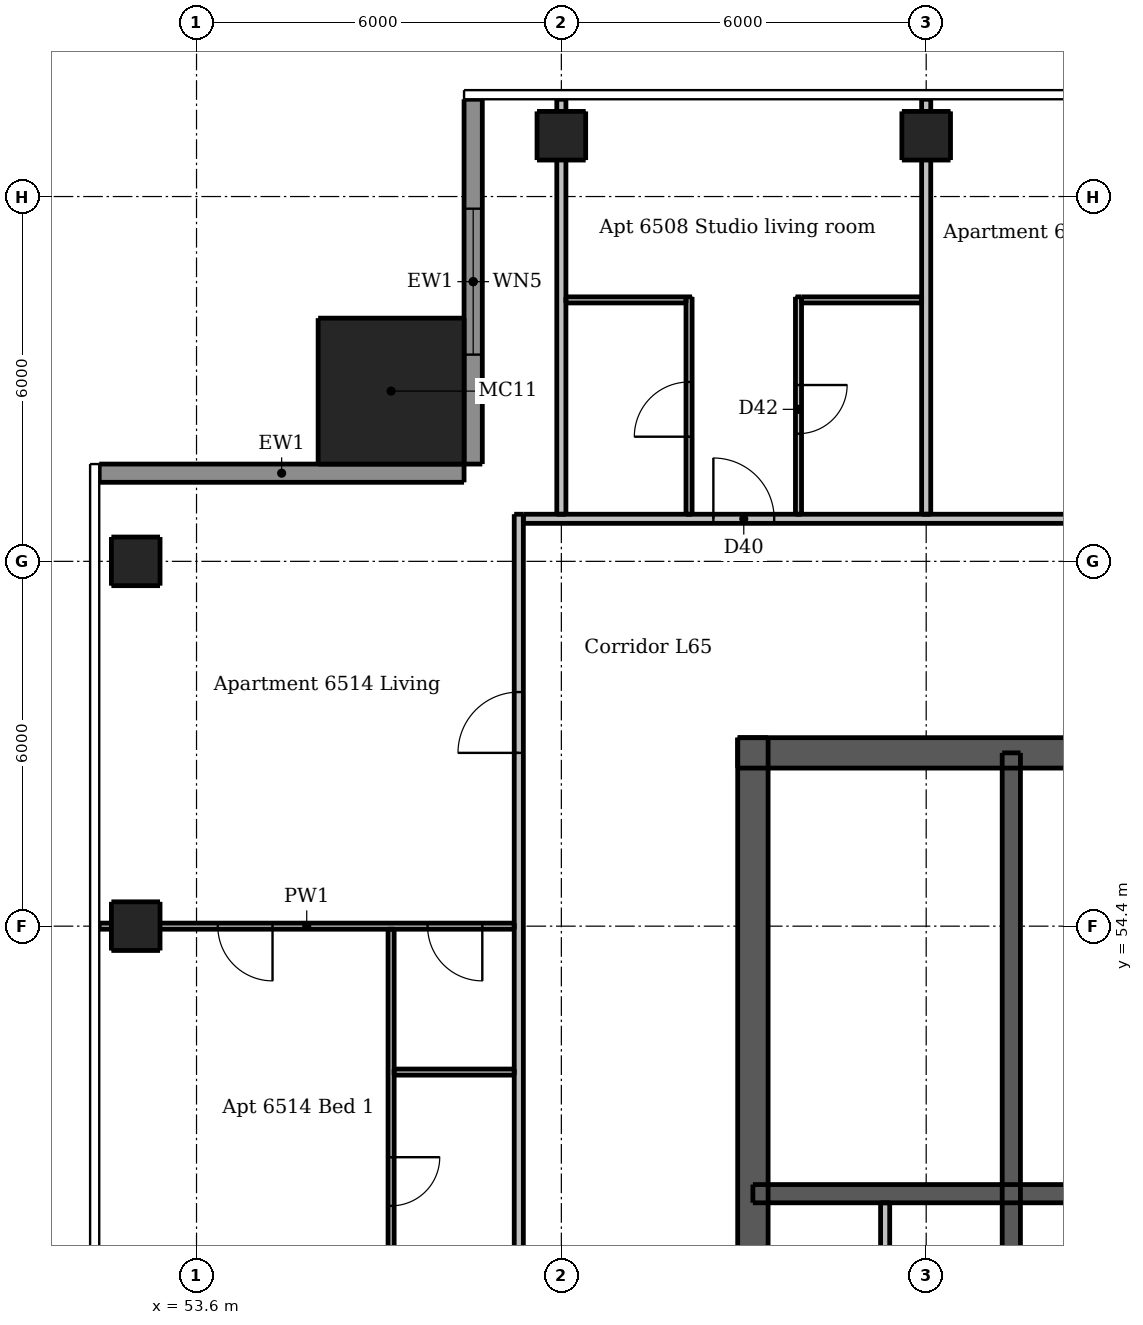
"""IFC4 building model, lengths in metres.
Left out: names, types, materials, properties, quantities, classifications, styles, units other than length and angle.
Written with IfcOpenShell. Run it as: python <this file> out.ifc"""

import sys

from ifc_helpers import new_model, si_unit, direction, frame, frame_2d, origin, origin_2d, place, context, subcontext, project, spatial, rectangle, extrude, element, fill, save


model = new_model("IFC4")
c1 = context("Model", 3, precision=1e-05, world=origin(), true_north=direction((0.0, 1.0)))
c2 = subcontext(c1, "Body", "Model", "MODEL_VIEW")
j1 = project(units=[si_unit("LENGTHUNIT", "METRE"), si_unit("PLANEANGLEUNIT", "RADIAN")], contexts=[c1])
p1 = place(None, origin())
s1 = spatial("IfcSite", under=j1, at=p1, CompositionType="ELEMENT")
p2 = place(p1, origin())
s2 = spatial("IfcBuilding", under=s1, at=p2, CompositionType="ELEMENT")
p3 = place(p2, frame((0.0, 0.0, 245.5)))
s3 = spatial("IfcBuildingStorey", under=s2, at=p3, CompositionType="ELEMENT", Elevation=245.5)
p4 = place(p3, frame((62.5, 57.25, 0.0), z_axis=(0.0, 0.0, 1.0), x_axis=(1.0, 0.0, 0.0)))
e1 = element("IfcWall", 1, at=p4, inside=s3, PredefinedType="SHEAR", context=c2, shape_type="SweptSolid", body=[
    extrude(rectangle(XDim=24.0, YDim=0.5, at=frame_2d((12.0, 0.0))), origin(), (0.0, 0.0, 1.0), 3.05),
])
p5 = place(p4, frame((21.025, 0.0, 0.0)))
e2 = element("IfcOpeningElement", 2, at=p5, cuts=e1, PredefinedType="OPENING", context=c2, shape_type="SweptSolid", body=[
    extrude(rectangle(XDim=1.1, YDim=2.1, at=frame_2d((0.55, 1.05))), frame((0.0, 0.26, 0.0), z_axis=(0.0, -1.0, 0.0), x_axis=(1.0, 0.0, 0.0)), (0.0, 0.0, 1.0), 0.52),
])
p6 = place(p4, frame((1.875, 0.0, 0.0)))
e3 = element("IfcOpeningElement", 3, at=p6, cuts=e1, PredefinedType="OPENING", context=c2, shape_type="SweptSolid", body=[
    extrude(rectangle(XDim=1.1, YDim=2.1, at=frame_2d((0.55, 1.05))), frame((0.0, 0.26, 0.0), z_axis=(0.0, -1.0, 0.0), x_axis=(1.0, 0.0, 0.0)), (0.0, 0.0, 1.0), 0.52),
])
p7 = place(p4, frame((7.875, 0.0, 0.0)))
e4 = element("IfcOpeningElement", 4, at=p7, cuts=e1, PredefinedType="OPENING", context=c2, shape_type="SweptSolid", body=[
    extrude(rectangle(XDim=0.9, YDim=2.1, at=frame_2d((0.45, 1.05))), frame((0.0, 0.26, 0.0), z_axis=(0.0, -1.0, 0.0), x_axis=(1.0, 0.0, 0.0)), (0.0, 0.0, 1.0), 0.52),
])
p8 = place(p4, frame((15.225, 0.0, 0.0)))
e5 = element("IfcOpeningElement", 5, at=p8, cuts=e1, PredefinedType="OPENING", context=c2, shape_type="SweptSolid", body=[
    extrude(rectangle(XDim=0.9, YDim=2.1, at=frame_2d((0.45, 1.05))), frame((0.0, 0.26, 0.0), z_axis=(0.0, -1.0, 0.0), x_axis=(1.0, 0.0, 0.0)), (0.0, 0.0, 1.0), 0.52),
])
p9 = place(p3, frame((62.75, 33.5, 0.0), z_axis=(0.0, 0.0, 1.0), x_axis=(0.0, 1.0, 0.0)))
e6 = element("IfcWall", 6, at=p9, inside=s3, PredefinedType="SHEAR", context=c2, shape_type="SweptSolid", body=[
    extrude(rectangle(XDim=24.0, YDim=0.5, at=frame_2d((12.0, 0.0))), origin(), (0.0, 0.0, 1.0), 3.05),
])
p10 = place(p9, frame((11.2, 0.0, 0.0)))
e7 = element("IfcOpeningElement", 7, at=p10, cuts=e6, PredefinedType="OPENING", context=c2, shape_type="SweptSolid", body=[
    extrude(rectangle(XDim=1.6, YDim=2.1, at=frame_2d((0.8, 1.05))), frame((0.0, 0.26, 0.0), z_axis=(0.0, -1.0, 0.0), x_axis=(1.0, 0.0, 0.0)), (0.0, 0.0, 1.0), 0.52),
])
p11 = place(p3, frame((62.75, 50.0, 0.0), z_axis=(0.0, 0.0, 1.0), x_axis=(1.0, 0.0, 0.0)))
e8 = element("IfcWall", 8, at=p11, inside=s3, PredefinedType="SHEAR", context=c2, shape_type="SweptSolid", body=[
    extrude(rectangle(XDim=23.5, YDim=0.3, at=frame_2d((11.75, 0.0))), origin(), (0.0, 0.0, 1.0), 3.05),
])
p12 = place(p3, frame((67.0, 47.1, 0.0), z_axis=(0.0, 0.0, 1.0), x_axis=(0.0, 1.0, 0.0)))
e9 = element("IfcWall", 9, at=p12, inside=s3, PredefinedType="SHEAR", context=c2, shape_type="SweptSolid", body=[
    extrude(rectangle(XDim=10.15, YDim=0.3, at=frame_2d((5.075, 0.0))), origin(), (0.0, 0.0, 1.0), 3.05),
])
for number, where, z_axis, x_axis in (
    (10, (59.6, 67.4, 0.0), (0.0, 0.0, 1.0), (1.0, 0.0, 0.0)),
    (11, (65.6, 67.4, 0.0), (0.0, 0.0, 1.0), (1.0, 0.0, 0.0)),
    (12, (52.6, 54.4, 0.0), (0.0, 0.0, 1.0), (1.0, 0.0, 0.0)),
    (13, (52.6, 60.4, 0.0), (0.0, 0.0, 1.0), (1.0, 0.0, 0.0)),
):
    element("IfcColumn", number, at=place(p3, frame(where, z_axis=z_axis, x_axis=x_axis)), inside=s3, PredefinedType="COLUMN", context=c2, shape_type="SweptSolid", body=[
        extrude(rectangle(XDim=0.8, YDim=0.8, at=origin_2d()), origin(), (0.0, 0.0, 1.0), 3.05),
    ])
p13 = place(p3, frame((56.8, 63.2, 0.0), z_axis=(0.0, 0.0, 1.0), x_axis=(1.0, 0.0, 0.0)))
e14 = element("IfcColumn", 14, at=p13, inside=s3, PredefinedType="COLUMN", context=c2, shape_type="SweptSolid", body=[
    extrude(rectangle(XDim=2.4, YDim=2.4, at=origin_2d()), origin(), (0.0, 0.0, 1.0), 3.3),
])
p14 = place(p3, frame((58.15, 68.0, 0.0), z_axis=(0.0, 0.0, 1.0), x_axis=(0.0, -1.0, 0.0)))
e15 = element("IfcWall", 15, at=p14, inside=s3, PredefinedType="SOLIDWALL", context=c2, shape_type="SweptSolid", body=[
    extrude(rectangle(XDim=6.0, YDim=0.3, at=frame_2d((3.0, 0.0))), origin(), (0.0, 0.0, 1.0), 3.05),
])
p15 = place(p14, frame((1.8, 0.0, 0.15)))
e16 = element("IfcOpeningElement", 16, at=p15, cuts=e15, PredefinedType="OPENING", context=c2, shape_type="SweptSolid", body=[
    extrude(rectangle(XDim=2.4, YDim=2.1, at=frame_2d((1.2, 1.05))), frame((0.0, 0.16, 0.0), z_axis=(0.0, -1.0, 0.0), x_axis=(1.0, 0.0, 0.0)), (0.0, 0.0, 1.0), 0.32),
])
p16 = place(p3, frame((58.0, 61.85, 0.0), z_axis=(0.0, 0.0, 1.0), x_axis=(-1.0, 0.0, 0.0)))
e17 = element("IfcWall", 17, at=p16, inside=s3, PredefinedType="SOLIDWALL", context=c2, shape_type="SweptSolid", body=[
    extrude(rectangle(XDim=6.0, YDim=0.3, at=frame_2d((3.0, 0.0))), origin(), (0.0, 0.0, 1.0), 3.05),
])
p17 = place(p3, frame((64.925, 47.25, 0.0), z_axis=(0.0, 0.0, 1.0), x_axis=(0.0, 1.0, 0.0)))
e18 = element("IfcWall", 18, at=p17, inside=s3, PredefinedType="PLUMBINGWALL", context=c2, shape_type="SweptSolid", body=[
    extrude(rectangle(XDim=2.6, YDim=0.15, at=frame_2d((1.3, 0.0))), origin(), (0.0, 0.0, 1.0), 3.05),
])
p18 = place(p3, frame((56.8, 54.35, 0.0), z_axis=(0.0, 0.0, 1.0), x_axis=(0.0, -1.0, 0.0)))
e19 = element("IfcWall", 19, at=p18, inside=s3, PredefinedType="PARTITIONING", context=c2, shape_type="SweptSolid", body=[
    extrude(rectangle(XDim=5.875, YDim=0.1, at=frame_2d((2.938, 0.0))), origin(), (0.0, 0.0, 1.0), 3.05),
])
p19 = place(p18, frame((3.75, 0.0, 0.0)))
e20 = element("IfcOpeningElement", 20, at=p19, cuts=e19, PredefinedType="OPENING", context=c2, shape_type="SweptSolid", body=[
    extrude(rectangle(XDim=0.8, YDim=2.1, at=frame_2d((0.4, 1.05))), frame((0.0, 0.06, 0.0), z_axis=(0.0, -1.0, 0.0), x_axis=(1.0, 0.0, 0.0)), (0.0, 0.0, 1.0), 0.12),
])
p20 = place(p3, frame((61.7, 61.175, 0.0), z_axis=(0.0, 0.0, 1.0), x_axis=(0.0, 1.0, 0.0)))
e21 = element("IfcWall", 21, at=p20, inside=s3, PredefinedType="PARTITIONING", context=c2, shape_type="SweptSolid", body=[
    extrude(rectangle(XDim=3.575, YDim=0.1, at=frame_2d((1.788, 0.0))), origin(), (0.0, 0.0, 1.0), 3.05),
])
p21 = place(p20, frame((1.275, 0.0, 0.0)))
e22 = element("IfcOpeningElement", 22, at=p21, cuts=e21, PredefinedType="OPENING", context=c2, shape_type="SweptSolid", body=[
    extrude(rectangle(XDim=0.9, YDim=2.1, at=frame_2d((0.45, 1.05))), frame((0.0, 0.06, 0.0), z_axis=(0.0, -1.0, 0.0), x_axis=(1.0, 0.0, 0.0)), (0.0, 0.0, 1.0), 0.12),
])
p22 = place(p3, frame((63.5, 64.75, 0.0), z_axis=(0.0, 0.0, 1.0), x_axis=(0.0, -1.0, 0.0)))
e23 = element("IfcWall", 23, at=p22, inside=s3, PredefinedType="PARTITIONING", context=c2, shape_type="SweptSolid", body=[
    extrude(rectangle(XDim=3.575, YDim=0.1, at=frame_2d((1.788, 0.0))), origin(), (0.0, 0.0, 1.0), 3.05),
])
p23 = place(p22, frame((1.45, 0.0, 0.0)))
e24 = element("IfcOpeningElement", 24, at=p23, cuts=e23, PredefinedType="OPENING", context=c2, shape_type="SweptSolid", body=[
    extrude(rectangle(XDim=0.8, YDim=2.1, at=frame_2d((0.4, 1.05))), frame((0.0, 0.06, 0.0), z_axis=(0.0, -1.0, 0.0), x_axis=(1.0, 0.0, 0.0)), (0.0, 0.0, 1.0), 0.12),
])
for number, where, z_axis, x_axis in (
    (25, (59.675, 64.7, 0.0), (0.0, 0.0, 1.0), (1.0, 0.0, 0.0)),
    (26, (63.55, 64.7, 0.0), (0.0, 0.0, 1.0), (1.0, 0.0, 0.0)),
):
    element("IfcWall", number, at=place(p3, frame(where, z_axis=z_axis, x_axis=x_axis)), inside=s3, PredefinedType="PARTITIONING", context=c2, shape_type="SweptSolid", body=[
        extrude(rectangle(XDim=1.975, YDim=0.1, at=frame_2d((0.987, 0.0))), origin(), (0.0, 0.0, 1.0), 3.05),
    ])
p24 = place(p3, frame((58.825, 54.4, 0.0), z_axis=(0.0, 0.0, 1.0), x_axis=(-1.0, 0.0, 0.0)))
e27 = element("IfcWall", 27, at=p24, inside=s3, PredefinedType="PARTITIONING", context=c2, shape_type="SweptSolid", body=[
    extrude(rectangle(XDim=6.825, YDim=0.1, at=frame_2d((3.413, 0.0))), origin(), (0.0, 0.0, 1.0), 2.516),
])
p25 = place(p24, frame((0.525, 0.0, 0.0)))
e28 = element("IfcOpeningElement", 28, at=p25, cuts=e27, PredefinedType="OPENING", context=c2, shape_type="SweptSolid", body=[
    extrude(rectangle(XDim=0.9, YDim=2.1, at=frame_2d((0.45, 1.05))), frame((0.0, 0.06, 0.0), z_axis=(0.0, -1.0, 0.0), x_axis=(1.0, 0.0, 0.0)), (0.0, 0.0, 1.0), 0.12),
])
p26 = place(p24, frame((3.975, 0.0, 0.0)))
e29 = element("IfcOpeningElement", 29, at=p26, cuts=e27, PredefinedType="OPENING", context=c2, shape_type="SweptSolid", body=[
    extrude(rectangle(XDim=0.9, YDim=2.1, at=frame_2d((0.45, 1.05))), frame((0.0, 0.06, 0.0), z_axis=(0.0, -1.0, 0.0), x_axis=(1.0, 0.0, 0.0)), (0.0, 0.0, 1.0), 0.12),
])
p27 = place(p3, frame((56.85, 52.0, 0.0), z_axis=(0.0, 0.0, 1.0), x_axis=(1.0, 0.0, 0.0)))
e30 = element("IfcWall", 30, at=p27, inside=s3, PredefinedType="PARTITIONING", context=c2, shape_type="SweptSolid", body=[
    extrude(rectangle(XDim=1.975, YDim=0.1, at=frame_2d((0.987, 0.0))), origin(), (0.0, 0.0, 1.0), 3.05),
])
p28 = place(p3, frame((58.9, 30.325, 0.0), z_axis=(0.0, 0.0, 1.0), x_axis=(0.0, 1.0, 0.0)))
e31 = element("IfcWall", 31, at=p28, inside=s3, PredefinedType="PARTITIONING", context=c2, shape_type="SweptSolid", body=[
    extrude(rectangle(XDim=30.85, YDim=0.15, at=frame_2d((15.425, 0.0))), origin(), (0.0, 0.0, 1.0), 3.05),
])
p29 = place(p28, frame((2.575, 0.0, 0.0)))
e32 = element("IfcOpeningElement", 32, at=p29, cuts=e31, PredefinedType="OPENING", context=c2, shape_type="SweptSolid", body=[
    extrude(rectangle(XDim=1.0, YDim=2.1, at=frame_2d((0.5, 1.05))), frame((0.0, 0.085, 0.0), z_axis=(0.0, -1.0, 0.0), x_axis=(1.0, 0.0, 0.0)), (0.0, 0.0, 1.0), 0.17),
])
p30 = place(p28, frame((8.575, 0.0, 0.0)))
e33 = element("IfcOpeningElement", 33, at=p30, cuts=e31, PredefinedType="OPENING", context=c2, shape_type="SweptSolid", body=[
    extrude(rectangle(XDim=1.0, YDim=2.1, at=frame_2d((0.5, 1.05))), frame((0.0, 0.085, 0.0), z_axis=(0.0, -1.0, 0.0), x_axis=(1.0, 0.0, 0.0)), (0.0, 0.0, 1.0), 0.17),
])
p31 = place(p28, frame((14.575, 0.0, 0.0)))
e34 = element("IfcOpeningElement", 34, at=p31, cuts=e31, PredefinedType="OPENING", context=c2, shape_type="SweptSolid", body=[
    extrude(rectangle(XDim=1.0, YDim=2.1, at=frame_2d((0.5, 1.05))), frame((0.0, 0.085, 0.0), z_axis=(0.0, -1.0, 0.0), x_axis=(1.0, 0.0, 0.0)), (0.0, 0.0, 1.0), 0.17),
])
p32 = place(p28, frame((26.925, 0.0, 0.0)))
e35 = element("IfcOpeningElement", 35, at=p32, cuts=e31, PredefinedType="OPENING", context=c2, shape_type="SweptSolid", body=[
    extrude(rectangle(XDim=1.0, YDim=2.1, at=frame_2d((0.5, 1.05))), frame((0.0, 0.085, 0.0), z_axis=(0.0, -1.0, 0.0), x_axis=(1.0, 0.0, 0.0)), (0.0, 0.0, 1.0), 0.17),
])
p33 = place(p3, frame((59.6, 61.175, 0.0), z_axis=(0.0, 0.0, 1.0), x_axis=(0.0, 1.0, 0.0)))
e36 = element("IfcWall", 36, at=p33, inside=s3, PredefinedType="PARTITIONING", context=c2, shape_type="SweptSolid", body=[
    extrude(rectangle(XDim=6.825, YDim=0.15, at=frame_2d((3.413, 0.0))), origin(), (0.0, 0.0, 1.0), 2.51),
])
p34 = place(p3, frame((65.6, 61.175, 0.0), z_axis=(0.0, 0.0, 1.0), x_axis=(0.0, 1.0, 0.0)))
e37 = element("IfcWall", 37, at=p34, inside=s3, PredefinedType="PARTITIONING", context=c2, shape_type="SweptSolid", body=[
    extrude(rectangle(XDim=6.825, YDim=0.15, at=frame_2d((3.413, 0.0))), origin(), (0.0, 0.0, 1.0), 2.516),
])
p35 = place(p3, frame((58.975, 61.1, 0.0), z_axis=(0.0, 0.0, 1.0), x_axis=(1.0, 0.0, 0.0)))
e38 = element("IfcWall", 38, at=p35, inside=s3, PredefinedType="PARTITIONING", context=c2, shape_type="SweptSolid", body=[
    extrude(rectangle(XDim=29.25, YDim=0.15, at=frame_2d((14.625, 0.0))), origin(), (0.0, 0.0, 1.0), 3.05),
])
p36 = place(p35, frame((3.125, 0.0, 0.0)))
e39 = element("IfcOpeningElement", 39, at=p36, cuts=e38, PredefinedType="OPENING", context=c2, shape_type="SweptSolid", body=[
    extrude(rectangle(XDim=1.0, YDim=2.1, at=frame_2d((0.5, 1.05))), frame((0.0, 0.085, 0.0), z_axis=(0.0, -1.0, 0.0), x_axis=(1.0, 0.0, 0.0)), (0.0, 0.0, 1.0), 0.17),
])
p37 = place(p35, frame((13.925, 0.0, 0.0)))
e40 = element("IfcOpeningElement", 40, at=p37, cuts=e38, PredefinedType="OPENING", context=c2, shape_type="SweptSolid", body=[
    extrude(rectangle(XDim=1.0, YDim=2.1, at=frame_2d((0.5, 1.05))), frame((0.0, 0.085, 0.0), z_axis=(0.0, -1.0, 0.0), x_axis=(1.0, 0.0, 0.0)), (0.0, 0.0, 1.0), 0.17),
])
p38 = place(p35, frame((26.475, 0.0, 0.0)))
e41 = element("IfcOpeningElement", 41, at=p38, cuts=e38, PredefinedType="OPENING", context=c2, shape_type="SweptSolid", body=[
    extrude(rectangle(XDim=1.0, YDim=2.1, at=frame_2d((0.5, 1.05))), frame((0.0, 0.085, 0.0), z_axis=(0.0, -1.0, 0.0), x_axis=(1.0, 0.0, 0.0)), (0.0, 0.0, 1.0), 0.17),
])
p39 = place(p15, origin())
e42 = element("IfcWindow", 42, at=p39, inside=s3, PartitioningType="DOUBLE_PANEL_VERTICAL", PredefinedType="WINDOW", context=c2, shape_type="SweptSolid", body=[
    extrude(rectangle(XDim=2.4, YDim=2.1, at=frame_2d((1.2, 1.05))), frame((0.0, 0.03, 0.0), z_axis=(0.0, -1.0, 0.0), x_axis=(1.0, 0.0, 0.0)), (0.0, 0.0, 1.0), 0.06),
])
fill(e16, e42)
p40 = place(p6, origin())
e43 = element("IfcDoor", 43, at=p40, inside=s3, OperationType="SINGLE_SWING_LEFT", PredefinedType="DOOR", context=c2, shape_type="SweptSolid", body=[
    extrude(rectangle(XDim=1.1, YDim=2.1, at=frame_2d((0.55, 1.05))), frame((0.0, -0.188, 0.0), z_axis=(0.0, -1.0, 0.0), x_axis=(1.0, 0.0, 0.0)), (0.0, 0.0, 1.0), 0.05),
])
fill(e3, e43)
p41 = place(p36, origin())
e44 = element("IfcDoor", 44, at=p41, inside=s3, OperationType="SINGLE_SWING_LEFT", PredefinedType="DOOR", context=c2, shape_type="SweptSolid", body=[
    extrude(rectangle(XDim=1.0, YDim=2.1, at=frame_2d((0.5, 1.05))), frame((0.0, 0.025, 0.0), z_axis=(0.0, -1.0, 0.0), x_axis=(1.0, 0.0, 0.0)), (0.0, 0.0, 1.0), 0.05),
])
fill(e39, e44)
p42 = place(p21, origin())
e45 = element("IfcDoor", 45, at=p42, inside=s3, OperationType="SINGLE_SWING_LEFT", PredefinedType="DOOR", context=c2, shape_type="SweptSolid", body=[
    extrude(rectangle(XDim=0.9, YDim=2.1, at=frame_2d((0.45, 1.05))), frame((0.0, 0.025, 0.0), z_axis=(0.0, -1.0, 0.0), x_axis=(1.0, 0.0, 0.0)), (0.0, 0.0, 1.0), 0.05),
])
fill(e22, e45)
p43 = place(p23, origin())
e46 = element("IfcDoor", 46, at=p43, inside=s3, OperationType="SINGLE_SWING_LEFT", PredefinedType="DOOR", context=c2, shape_type="SweptSolid", body=[
    extrude(rectangle(XDim=0.8, YDim=2.1, at=frame_2d((0.4, 1.05))), frame((0.0, 0.025, 0.0), z_axis=(0.0, -1.0, 0.0), x_axis=(1.0, 0.0, 0.0)), (0.0, 0.0, 1.0), 0.05),
])
fill(e24, e46)
p44 = place(p32, origin())
e47 = element("IfcDoor", 47, at=p44, inside=s3, OperationType="SINGLE_SWING_LEFT", PredefinedType="DOOR", context=c2, shape_type="SweptSolid", body=[
    extrude(rectangle(XDim=1.0, YDim=2.1, at=frame_2d((0.5, 1.05))), frame((0.0, 0.025, 0.0), z_axis=(0.0, -1.0, 0.0), x_axis=(1.0, 0.0, 0.0)), (0.0, 0.0, 1.0), 0.05),
])
fill(e35, e47)
p45 = place(p25, origin())
e48 = element("IfcDoor", 48, at=p45, inside=s3, OperationType="SINGLE_SWING_LEFT", PredefinedType="DOOR", context=c2, shape_type="SweptSolid", body=[
    extrude(rectangle(XDim=0.9, YDim=2.1, at=frame_2d((0.45, 1.05))), frame((0.0, 0.025, 0.0), z_axis=(0.0, -1.0, 0.0), x_axis=(1.0, 0.0, 0.0)), (0.0, 0.0, 1.0), 0.05),
])
fill(e28, e48)
p46 = place(p26, origin())
e49 = element("IfcDoor", 49, at=p46, inside=s3, OperationType="SINGLE_SWING_LEFT", PredefinedType="DOOR", context=c2, shape_type="SweptSolid", body=[
    extrude(rectangle(XDim=0.9, YDim=2.1, at=frame_2d((0.45, 1.05))), frame((0.0, 0.025, 0.0), z_axis=(0.0, -1.0, 0.0), x_axis=(1.0, 0.0, 0.0)), (0.0, 0.0, 1.0), 0.05),
])
fill(e29, e49)
p47 = place(p19, origin())
e50 = element("IfcDoor", 50, at=p47, inside=s3, OperationType="SINGLE_SWING_LEFT", PredefinedType="DOOR", context=c2, shape_type="SweptSolid", body=[
    extrude(rectangle(XDim=0.8, YDim=2.1, at=frame_2d((0.4, 1.05))), frame((0.0, 0.025, 0.0), z_axis=(0.0, -1.0, 0.0), x_axis=(1.0, 0.0, 0.0)), (0.0, 0.0, 1.0), 0.05),
])
fill(e20, e50)
save(model, sys.argv[1])
